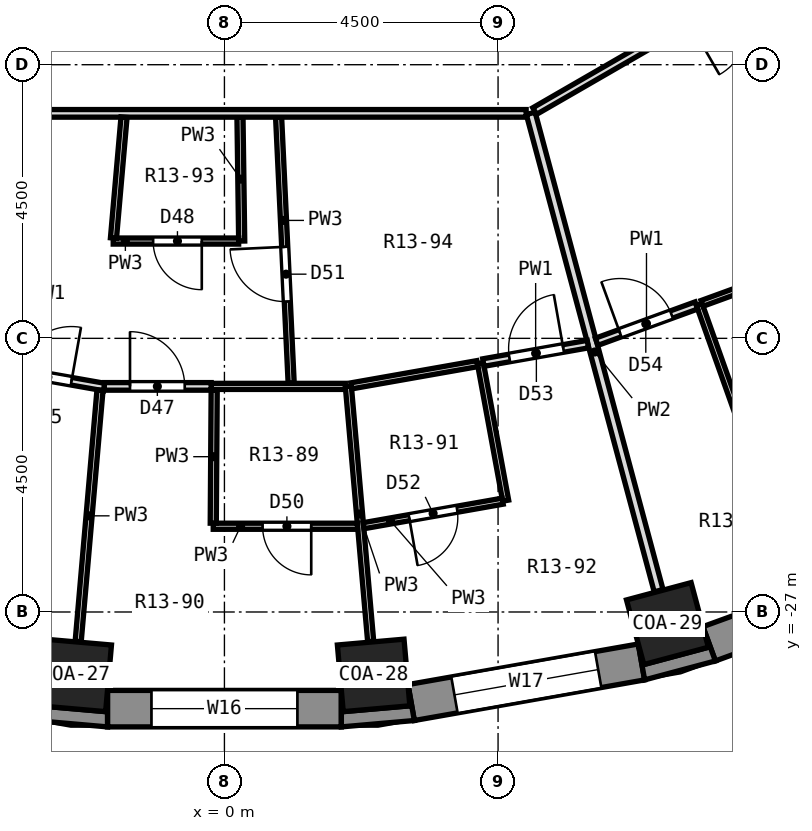
"""IFC4 building model, lengths in metres.
Left out: names, types, materials, properties, quantities, classifications, styles, units other than length and angle.
Written with IfcOpenShell. Run it as: python <this file> out.ifc"""

import sys

from ifc_helpers import new_model, si_unit, direction, frame, frame_2d, origin, origin_2d, place, context, subcontext, project, spatial, polyline, rectangle, outline, extrude, element, fill, save


model = new_model("IFC4")
c1 = context("Model", 3, precision=1e-05, world=origin(), true_north=direction((0.0, 1.0)))
c2 = subcontext(c1, "Body", "Model", "MODEL_VIEW")
j1 = project(units=[si_unit("LENGTHUNIT", "METRE"), si_unit("PLANEANGLEUNIT", "RADIAN")], contexts=[c1])
p1 = place(None, origin())
s1 = spatial("IfcSite", under=j1, at=p1, CompositionType="ELEMENT")
p2 = place(p1, origin())
s2 = spatial("IfcBuilding", under=s1, at=p2, CompositionType="ELEMENT")
p3 = place(p2, frame((0.0, 0.0, 65.9)))
s3 = spatial("IfcBuildingStorey", under=s2, at=p3, CompositionType="ELEMENT", Elevation=65.9)
for number, where, z_axis, x_axis in (
    (1, (-2.453, -28.043, 0.0), (0.0, 0.0, 1.0), (-0.087, -0.996, 0.0)),
    (2, (2.453, -28.043, 0.0), (0.0, 0.0, 1.0), (0.087, -0.996, 0.0)),
    (3, (7.286, -27.191, 0.0), (0.0, 0.0, 1.0), (0.259, -0.966, 0.0)),
):
    element("IfcColumn", number, at=place(p3, frame(where, z_axis=z_axis, x_axis=x_axis)), inside=s3, PredefinedType="COLUMN", context=c2, shape_type="SweptSolid", body=[
        extrude(rectangle(XDim=1.1, YDim=1.1, at=origin_2d()), origin(), (0.0, 0.0, 1.0), 3.3),
    ])
p4 = place(p3, frame((-1.923, -28.59, 0.0), z_axis=(0.0, 0.0, 1.0), x_axis=(1.0, 0.0, 0.0)))
e4 = element("IfcWall", 4, at=p4, inside=s3, PredefinedType="SOLIDWALL", context=c2, shape_type="SweptSolid", body=[
    extrude(rectangle(XDim=3.846, YDim=0.6, at=frame_2d((1.923, 0.0))), origin(), (0.0, 0.0, 1.0), 2.75),
])
p5 = place(p4, frame((0.723, 0.0, 0.9)))
e5 = element("IfcOpeningElement", 5, at=p5, cuts=e4, PredefinedType="OPENING", context=c2, shape_type="SweptSolid", body=[
    extrude(rectangle(XDim=2.4, YDim=1.8, at=frame_2d((1.2, 0.9))), frame((0.0, 0.312, 0.0), z_axis=(0.0, -1.0, 0.0), x_axis=(1.0, 0.0, 0.0)), (0.0, 0.0, 1.0), 0.624),
])
p6 = place(p3, frame((3.071, -28.489, 0.0), z_axis=(0.0, 0.0, 1.0), x_axis=(0.984800809218, 0.173687553279, 0.0)))
e6 = element("IfcWall", 6, at=p6, inside=s3, PredefinedType="SOLIDWALL", context=c2, shape_type="SweptSolid", body=[
    extrude(rectangle(XDim=3.846, YDim=0.6, at=frame_2d((1.923, 0.0))), origin(), (0.0, 0.0, 1.0), 2.75),
])
p7 = place(p6, frame((0.723, 0.0, 0.9)))
e7 = element("IfcOpeningElement", 7, at=p7, cuts=e6, PredefinedType="OPENING", context=c2, shape_type="SweptSolid", body=[
    extrude(rectangle(XDim=2.4, YDim=1.8, at=frame_2d((1.2, 0.9))), frame((0.0, 0.312, 0.0), z_axis=(0.0, -1.0, 0.0), x_axis=(1.0, 0.0, 0.0)), (0.0, 0.0, 1.0), 0.624),
])
p8 = place(p3, frame((7.971, -27.523, 0.0), z_axis=(0.0, 0.0, 1.0), x_axis=(0.939689588564, 0.342028474173, 0.0)))
e8 = element("IfcWall", 8, at=p8, inside=s3, PredefinedType="SOLIDWALL", context=c2, shape_type="SweptSolid", body=[
    extrude(rectangle(XDim=3.846, YDim=0.6, at=frame_2d((1.923, 0.0))), origin(), (0.0, 0.0, 1.0), 2.75),
])
p9 = place(p8, frame((0.723, 0.0, 0.9)))
e9 = element("IfcOpeningElement", 9, at=p9, cuts=e8, PredefinedType="OPENING", context=c2, shape_type="SweptSolid", body=[
    extrude(rectangle(XDim=2.4, YDim=1.8, at=frame_2d((1.2, 0.9))), frame((0.0, 0.312, 0.0), z_axis=(0.0, -1.0, 0.0), x_axis=(1.0, 0.0, 0.0)), (0.0, 0.0, 1.0), 0.624),
])
p10 = place(p3, origin())
e10 = element("IfcWall", 10, at=p10, inside=s3, PredefinedType="SOLIDWALL", context=c2, shape_type="SweptSolid", body=[
    extrude(outline(polyline([(-3.123, -28.785), (-1.923, -28.89), (-1.923, -28.29), (-1.954, -28.639), (-3.049, -28.543), (-3.019, -28.194), (-3.123, -28.785)])), origin(), (0.0, 0.0, 1.0), 2.75),
])
p11 = place(p3, origin())
e11 = element("IfcWall", 11, at=p11, inside=s3, PredefinedType="SOLIDWALL", context=c2, shape_type="SweptSolid", body=[
    extrude(outline(polyline([(1.923, -28.89), (3.123, -28.785), (3.019, -28.194), (3.049, -28.543), (1.954, -28.639), (1.923, -28.29), (1.923, -28.89)])), origin(), (0.0, 0.0, 1.0), 2.75),
])
p12 = place(p3, origin())
e12 = element("IfcWall", 12, at=p12, inside=s3, PredefinedType="SOLIDWALL", context=c2, shape_type="SweptSolid", body=[
    extrude(outline(polyline([(6.91, -28.117), (8.074, -27.805), (7.869, -27.241), (7.959, -27.58), (6.897, -27.865), (6.806, -27.526), (6.91, -28.117)])), origin(), (0.0, 0.0, 1.0), 2.75),
])
p13 = place(p3, frame((0.256, -18.863, 0.0), z_axis=(0.0, 0.0, 1.0), x_axis=(0.013779398664, -0.999905059579, 0.0)))
e13 = element("IfcWall", 13, at=p13, inside=s3, PredefinedType="PARTITIONING", context=c2, shape_type="SweptSolid", body=[
    extrude(rectangle(XDim=2.038, YDim=0.1, at=frame_2d((1.019, 0.0))), origin(), (0.0, 0.0, 1.0), 2.75),
])
p14 = place(p3, frame((0.891, -18.863, 0.0), z_axis=(0.0, 0.0, 1.0), x_axis=(0.047186643512, -0.998886089939, 0.0)))
e14 = element("IfcWall", 14, at=p14, inside=s3, PredefinedType="PARTITIONING", context=c2, shape_type="SweptSolid", body=[
    extrude(rectangle(XDim=4.382, YDim=0.1, at=frame_2d((2.191, 0.0))), origin(), (0.0, 0.0, 1.0), 2.75),
])
p15 = place(p14, frame((2.135, 0.0, 0.0)))
e15 = element("IfcOpeningElement", 15, at=p15, cuts=e14, PredefinedType="OPENING", context=c2, shape_type="SweptSolid", body=[
    extrude(rectangle(XDim=0.9, YDim=2.1, at=frame_2d((0.45, 1.05))), frame((0.0, 0.062, 0.0), z_axis=(0.0, -1.0, 0.0), x_axis=(1.0, 0.0, 0.0)), (0.0, 0.0, 1.0), 0.124),
])
p16 = place(p3, frame((2.038, -23.29, 0.0), z_axis=(0.0, 0.0, 1.0), x_axis=(0.087200034709, -0.996190822055, 0.0)))
e16 = element("IfcWall", 16, at=p16, inside=s3, PredefinedType="PARTITIONING", context=c2, shape_type="SweptSolid", body=[
    extrude(rectangle(XDim=4.211, YDim=0.1, at=frame_2d((2.105, 0.0))), origin(), (0.0, 0.0, 1.0), 2.75),
])
p17 = place(p3, frame((4.209, -22.907, 0.0), z_axis=(0.0, 0.0, 1.0), x_axis=(0.180884135875, -0.983504412491, 0.0)))
e17 = element("IfcWall", 17, at=p17, inside=s3, PredefinedType="PARTITIONING", context=c2, shape_type="SweptSolid", body=[
    extrude(rectangle(XDim=2.3, YDim=0.1, at=frame_2d((1.15, 0.0))), origin(), (0.0, 0.0, 1.0), 2.75),
])
p18 = place(p3, frame((5.037, -18.8, 0.0), z_axis=(0.0, 0.0, 1.0), x_axis=(0.258808663505, -0.96592860797, 0.0)))
e18 = element("IfcWall", 18, at=p18, inside=s3, PredefinedType="PARTITIONING", context=c2, shape_type="SweptSolid", body=[
    extrude(rectangle(XDim=8.127, YDim=0.15, at=frame_2d((4.063, 0.0))), origin(), (0.0, 0.0, 1.0), 2.75),
])
p19 = place(p3, frame((7.808, -21.942, 0.0), z_axis=(0.0, 0.0, 1.0), x_axis=(0.335206501266, -0.942144681835, 0.0)))
e19 = element("IfcWall", 19, at=p19, inside=s3, PredefinedType="PARTITIONING", context=c2, shape_type="SweptSolid", body=[
    extrude(rectangle(XDim=2.3, YDim=0.1, at=frame_2d((1.15, 0.0))), origin(), (0.0, 0.0, 1.0), 2.75),
])
p20 = place(p3, frame((-3.83, -22.974, 0.0), z_axis=(0.0, 0.0, 1.0), x_axis=(0.984767891191, -0.173874093757, 0.0)))
e20 = element("IfcWall", 20, at=p20, inside=s3, PredefinedType="PARTITIONING", context=c2, shape_type="SweptSolid", body=[
    extrude(rectangle(XDim=1.883, YDim=0.125, at=frame_2d((0.941, 0.0))), origin(), (0.0, 0.0, 1.0), 2.75),
])
p21 = place(p20, frame((0.435, 0.0, 0.0)))
e21 = element("IfcOpeningElement", 21, at=p21, cuts=e20, PredefinedType="OPENING", context=c2, shape_type="SweptSolid", body=[
    extrude(rectangle(XDim=0.9, YDim=2.1, at=frame_2d((0.45, 1.05))), frame((0.0, 0.074, 0.0), z_axis=(0.0, -1.0, 0.0), x_axis=(1.0, 0.0, 0.0)), (0.0, 0.0, 1.0), 0.149),
])
p22 = place(p3, frame((-0.184, -25.59, 0.0), z_axis=(0.0, 0.0, 1.0), x_axis=(1.0, 0.0, 0.0)))
e22 = element("IfcWall", 22, at=p22, inside=s3, PredefinedType="PARTITIONING", context=c2, shape_type="SweptSolid", body=[
    extrude(rectangle(XDim=2.373, YDim=0.1, at=frame_2d((1.187, 0.0))), origin(), (0.0, 0.0, 1.0), 2.75),
])
p23 = place(p22, frame((0.812, 0.0, 0.0)))
e23 = element("IfcOpeningElement", 23, at=p23, cuts=e22, PredefinedType="OPENING", context=c2, shape_type="SweptSolid", body=[
    extrude(rectangle(XDim=0.8, YDim=2.1, at=frame_2d((0.4, 1.05))), frame((0.0, 0.062, 0.0), z_axis=(0.0, -1.0, 0.0), x_axis=(1.0, 0.0, 0.0)), (0.0, 0.0, 1.0), 0.124),
])
p24 = place(p3, frame((-0.218, -23.29, 0.0), z_axis=(0.0, 0.0, 1.0), x_axis=(1.0, 0.0, 0.0)))
e24 = element("IfcWall", 24, at=p24, inside=s3, PredefinedType="PARTITIONING", context=c2, shape_type="SweptSolid", body=[
    extrude(rectangle(XDim=2.206, YDim=0.1, at=frame_2d((1.103, 0.0))), origin(), (0.0, 0.0, 1.0), 2.75),
])
p25 = place(p3, frame((-1.976, -23.29, 0.0), z_axis=(0.0, 0.0, 1.0), x_axis=(1.0, 0.0, 0.0)))
e25 = element("IfcWall", 25, at=p25, inside=s3, PredefinedType="PARTITIONING", context=c2, shape_type="SweptSolid", body=[
    extrude(rectangle(XDim=1.758, YDim=0.125, at=frame_2d((0.879, 0.0))), origin(), (0.0, 0.0, 1.0), 2.75),
])
p26 = place(p25, frame((0.423, 0.0, 0.0)))
e26 = element("IfcOpeningElement", 26, at=p26, cuts=e25, PredefinedType="OPENING", context=c2, shape_type="SweptSolid", body=[
    extrude(rectangle(XDim=0.9, YDim=2.1, at=frame_2d((0.45, 1.05))), frame((0.0, 0.074, 0.0), z_axis=(0.0, -1.0, 0.0), x_axis=(1.0, 0.0, 0.0)), (0.0, 0.0, 1.0), 0.149),
])
p27 = place(p3, frame((-1.829, -20.9, 0.0), z_axis=(0.0, 0.0, 1.0), x_axis=(1.0, 0.0, 0.0)))
e27 = element("IfcWall", 27, at=p27, inside=s3, PredefinedType="PARTITIONING", context=c2, shape_type="SweptSolid", body=[
    extrude(rectangle(XDim=2.063, YDim=0.1, at=frame_2d((1.031, 0.0))), origin(), (0.0, 0.0, 1.0), 2.75),
])
p28 = place(p27, frame((0.656, 0.0, 0.0)))
e28 = element("IfcOpeningElement", 28, at=p28, cuts=e27, PredefinedType="OPENING", context=c2, shape_type="SweptSolid", body=[
    extrude(rectangle(XDim=0.8, YDim=2.1, at=frame_2d((0.4, 1.05))), frame((0.0, 0.062, 0.0), z_axis=(0.0, -1.0, 0.0), x_axis=(1.0, 0.0, 0.0)), (0.0, 0.0, 1.0), 0.124),
])
p29 = place(p3, frame((-4.975, -18.8, 0.0), z_axis=(0.0, 0.0, 1.0), x_axis=(1.0, 0.0, 0.0)))
e29 = element("IfcWall", 29, at=p29, inside=s3, PredefinedType="PARTITIONING", context=c2, shape_type="SweptSolid", body=[
    extrude(rectangle(XDim=9.937, YDim=0.125, at=frame_2d((4.968, 0.0))), origin(), (0.0, 0.0, 1.0), 2.75),
])
p30 = place(p3, frame((2.288, -25.581, 0.0), z_axis=(0.0, 0.0, 1.0), x_axis=(0.984789907179, 0.173749356022, 0.0)))
e30 = element("IfcWall", 30, at=p30, inside=s3, PredefinedType="PARTITIONING", context=c2, shape_type="SweptSolid", body=[
    extrude(rectangle(XDim=2.323, YDim=0.1, at=frame_2d((1.161, 0.0))), origin(), (0.0, 0.0, 1.0), 2.75),
])
p31 = place(p30, frame((0.761, 0.0, 0.0)))
e31 = element("IfcOpeningElement", 31, at=p31, cuts=e30, PredefinedType="OPENING", context=c2, shape_type="SweptSolid", body=[
    extrude(rectangle(XDim=0.8, YDim=2.1, at=frame_2d((0.4, 1.05))), frame((0.0, 0.062, 0.0), z_axis=(0.0, -1.0, 0.0), x_axis=(1.0, 0.0, 0.0)), (0.0, 0.0, 1.0), 0.124),
])
p32 = place(p3, frame((2.087, -23.281, 0.0), z_axis=(0.0, 0.0, 1.0), x_axis=(0.984804573467, 0.173666208797, 0.0)))
e32 = element("IfcWall", 32, at=p32, inside=s3, PredefinedType="PARTITIONING", context=c2, shape_type="SweptSolid", body=[
    extrude(rectangle(XDim=2.104, YDim=0.1, at=frame_2d((1.052, 0.0))), origin(), (0.0, 0.0, 1.0), 2.75),
])
p33 = place(p3, frame((4.258, -22.898, 0.0), z_axis=(0.0, 0.0, 1.0), x_axis=(0.984792007097, 0.173737453525, 0.0)))
e33 = element("IfcWall", 33, at=p33, inside=s3, PredefinedType="PARTITIONING", context=c2, shape_type="SweptSolid", body=[
    extrude(rectangle(XDim=1.745, YDim=0.125, at=frame_2d((0.873, 0.0))), origin(), (0.0, 0.0, 1.0), 2.75),
])
p34 = place(p33, frame((0.435, 0.0, 0.0)))
e34 = element("IfcOpeningElement", 34, at=p34, cuts=e33, PredefinedType="OPENING", context=c2, shape_type="SweptSolid", body=[
    extrude(rectangle(XDim=0.9, YDim=2.1, at=frame_2d((0.45, 1.05))), frame((0.0, 0.074, 0.0), z_axis=(0.0, -1.0, 0.0), x_axis=(1.0, 0.0, 0.0)), (0.0, 0.0, 1.0), 0.149),
])
p35 = place(p3, frame((7.855, -21.925, 0.0), z_axis=(0.0, 0.0, 1.0), x_axis=(0.939725675468, 0.341929312674, 0.0)))
e35 = element("IfcWall", 35, at=p35, inside=s3, PredefinedType="PARTITIONING", context=c2, shape_type="SweptSolid", body=[
    extrude(rectangle(XDim=2.105, YDim=0.1, at=frame_2d((1.052, 0.0))), origin(), (0.0, 0.0, 1.0), 2.75),
])
p36 = place(p3, frame((6.122, -22.556, 0.0), z_axis=(0.0, 0.0, 1.0), x_axis=(0.939605351125, 0.342259819635, 0.0)))
e36 = element("IfcWall", 36, at=p36, inside=s3, PredefinedType="PARTITIONING", context=c2, shape_type="SweptSolid", body=[
    extrude(rectangle(XDim=1.745, YDim=0.125, at=frame_2d((0.873, 0.0))), origin(), (0.0, 0.0, 1.0), 2.75),
])
p37 = place(p36, frame((0.41, 0.0, 0.0)))
e37 = element("IfcOpeningElement", 37, at=p37, cuts=e36, PredefinedType="OPENING", context=c2, shape_type="SweptSolid", body=[
    extrude(rectangle(XDim=0.9, YDim=2.1, at=frame_2d((0.45, 1.05))), frame((0.0, 0.074, 0.0), z_axis=(0.0, -1.0, 0.0), x_axis=(1.0, 0.0, 0.0)), (0.0, 0.0, 1.0), 0.149),
])
p38 = place(p3, frame((5.102, -18.762, 0.0), z_axis=(0.0, 0.0, 1.0), x_axis=(0.866071189182, 0.499920688979, 0.0)))
e38 = element("IfcWall", 38, at=p38, inside=s3, PredefinedType="PARTITIONING", context=c2, shape_type="SweptSolid", body=[
    extrude(rectangle(XDim=9.95, YDim=0.125, at=frame_2d((4.975, 0.0))), origin(), (0.0, 0.0, 1.0), 2.75),
])
p39 = place(p38, frame((2.932, 0.0, 0.0)))
e39 = element("IfcOpeningElement", 39, at=p39, cuts=e38, PredefinedType="OPENING", context=c2, shape_type="SweptSolid", body=[
    extrude(rectangle(XDim=1.0, YDim=2.1, at=frame_2d((0.5, 1.05))), frame((0.0, 0.074, 0.0), z_axis=(0.0, -1.0, 0.0), x_axis=(1.0, 0.0, 0.0)), (0.0, 0.0, 1.0), 0.149),
])
p40 = place(p3, frame((-2.405, -27.485, 0.0), z_axis=(0.0, 0.0, 1.0), x_axis=(0.086512794622, 0.996250739707, 0.0)))
e40 = element("IfcWall", 40, at=p40, inside=s3, PredefinedType="PARTITIONING", context=c2, shape_type="SweptSolid", body=[
    extrude(rectangle(XDim=4.148, YDim=0.1, at=frame_2d((2.074, 0.0))), origin(), (0.0, 0.0, 1.0), 2.75),
])
p41 = place(p3, frame((-1.825, -20.85, 0.0), z_axis=(0.0, 0.0, 1.0), x_axis=(0.087115345234, 0.996198231591, 0.0)))
e41 = element("IfcWall", 41, at=p41, inside=s3, PredefinedType="PARTITIONING", context=c2, shape_type="SweptSolid", body=[
    extrude(rectangle(XDim=1.995, YDim=0.1, at=frame_2d((0.998, 0.0))), origin(), (0.0, 0.0, 1.0), 2.75),
])
p42 = place(p3, frame((-0.184, -25.54, 0.0), z_axis=(0.0, 0.0, 1.0), x_axis=(0.006919477202, 0.999976060131, 0.0)))
e42 = element("IfcWall", 42, at=p42, inside=s3, PredefinedType="PARTITIONING", context=c2, shape_type="SweptSolid", body=[
    extrude(rectangle(XDim=2.188, YDim=0.1, at=frame_2d((1.094, 0.0))), origin(), (0.0, 0.0, 1.0), 2.75),
])
p43 = place(p5, origin())
e43 = element("IfcWindow", 43, at=p43, inside=s3, PartitioningType="SINGLE_PANEL", PredefinedType="WINDOW", context=c2, shape_type="SweptSolid", body=[
    extrude(rectangle(XDim=2.4, YDim=1.8, at=frame_2d((1.2, 0.9))), frame((0.0, 0.18, 0.0), z_axis=(0.0, -1.0, 0.0), x_axis=(1.0, 0.0, 0.0)), (0.0, 0.0, 1.0), 0.06),
])
fill(e5, e43)
p44 = place(p7, origin())
e44 = element("IfcWindow", 44, at=p44, inside=s3, PartitioningType="SINGLE_PANEL", PredefinedType="WINDOW", context=c2, shape_type="SweptSolid", body=[
    extrude(rectangle(XDim=2.4, YDim=1.8, at=frame_2d((1.2, 0.9))), frame((0.0, 0.18, 0.0), z_axis=(0.0, -1.0, 0.0), x_axis=(1.0, 0.0, 0.0)), (0.0, 0.0, 1.0), 0.06),
])
fill(e7, e44)
p45 = place(p21, origin())
e45 = element("IfcDoor", 45, at=p45, inside=s3, OperationType="SINGLE_SWING_RIGHT", PredefinedType="DOOR", context=c2, shape_type="SweptSolid", body=[
    extrude(rectangle(XDim=0.9, YDim=2.1, at=frame_2d((0.45, 1.05))), frame((0.0, 0.025, 0.0), z_axis=(0.0, -1.0, 0.0), x_axis=(1.0, 0.0, 0.0)), (0.0, 0.0, 1.0), 0.05),
])
fill(e21, e45)
p46 = place(p26, origin())
e46 = element("IfcDoor", 46, at=p46, inside=s3, OperationType="SINGLE_SWING_LEFT", PredefinedType="DOOR", context=c2, shape_type="SweptSolid", body=[
    extrude(rectangle(XDim=0.9, YDim=2.1, at=frame_2d((0.45, 1.05))), frame((0.0, 0.025, 0.0), z_axis=(0.0, -1.0, 0.0), x_axis=(1.0, 0.0, 0.0)), (0.0, 0.0, 1.0), 0.05),
])
fill(e26, e46)
p47 = place(p28, frame((0.8, 0.0, 0.0), z_axis=(0.0, 0.0, 1.0), x_axis=(-1.0, 0.0, 0.0)))
e47 = element("IfcDoor", 47, at=p47, inside=s3, OperationType="SINGLE_SWING_LEFT", PredefinedType="DOOR", context=c2, shape_type="SweptSolid", body=[
    extrude(rectangle(XDim=0.8, YDim=2.1, at=frame_2d((0.4, 1.05))), frame((0.0, 0.025, 0.0), z_axis=(0.0, -1.0, 0.0), x_axis=(1.0, 0.0, 0.0)), (0.0, 0.0, 1.0), 0.05),
])
fill(e28, e47)
p48 = place(p23, frame((0.8, 0.0, 0.0), z_axis=(0.0, 0.0, 1.0), x_axis=(-1.0, 0.0, 0.0)))
e48 = element("IfcDoor", 48, at=p48, inside=s3, OperationType="SINGLE_SWING_LEFT", PredefinedType="DOOR", context=c2, shape_type="SweptSolid", body=[
    extrude(rectangle(XDim=0.8, YDim=2.1, at=frame_2d((0.4, 1.05))), frame((0.0, 0.025, 0.0), z_axis=(0.0, -1.0, 0.0), x_axis=(1.0, 0.0, 0.0)), (0.0, 0.0, 1.0), 0.05),
])
fill(e23, e48)
p49 = place(p15, frame((0.9, 0.0, 0.0), z_axis=(0.0, 0.0, 1.0), x_axis=(-1.0, 0.0, 0.0)))
e49 = element("IfcDoor", 49, at=p49, inside=s3, OperationType="SINGLE_SWING_RIGHT", PredefinedType="DOOR", context=c2, shape_type="SweptSolid", body=[
    extrude(rectangle(XDim=0.9, YDim=2.1, at=frame_2d((0.45, 1.05))), frame((0.0, 0.025, 0.0), z_axis=(0.0, -1.0, 0.0), x_axis=(1.0, 0.0, 0.0)), (0.0, 0.0, 1.0), 0.05),
])
fill(e15, e49)
p50 = place(p31, frame((0.8, 0.0, 0.0), z_axis=(0.0, 0.0, 1.0), x_axis=(-1.0, 0.0, 0.0)))
e50 = element("IfcDoor", 50, at=p50, inside=s3, OperationType="SINGLE_SWING_RIGHT", PredefinedType="DOOR", context=c2, shape_type="SweptSolid", body=[
    extrude(rectangle(XDim=0.8, YDim=2.1, at=frame_2d((0.4, 1.05))), frame((0.0, 0.025, 0.0), z_axis=(0.0, -1.0, 0.0), x_axis=(1.0, 0.0, 0.0)), (0.0, 0.0, 1.0), 0.05),
])
fill(e31, e50)
p51 = place(p34, origin())
e51 = element("IfcDoor", 51, at=p51, inside=s3, OperationType="SINGLE_SWING_RIGHT", PredefinedType="DOOR", context=c2, shape_type="SweptSolid", body=[
    extrude(rectangle(XDim=0.9, YDim=2.1, at=frame_2d((0.45, 1.05))), frame((0.0, 0.025, 0.0), z_axis=(0.0, -1.0, 0.0), x_axis=(1.0, 0.0, 0.0)), (0.0, 0.0, 1.0), 0.05),
])
fill(e34, e51)
p52 = place(p37, origin())
e52 = element("IfcDoor", 52, at=p52, inside=s3, OperationType="SINGLE_SWING_LEFT", PredefinedType="DOOR", context=c2, shape_type="SweptSolid", body=[
    extrude(rectangle(XDim=0.9, YDim=2.1, at=frame_2d((0.45, 1.05))), frame((0.0, 0.025, 0.0), z_axis=(0.0, -1.0, 0.0), x_axis=(1.0, 0.0, 0.0)), (0.0, 0.0, 1.0), 0.05),
])
fill(e37, e52)
save(model, sys.argv[1])
